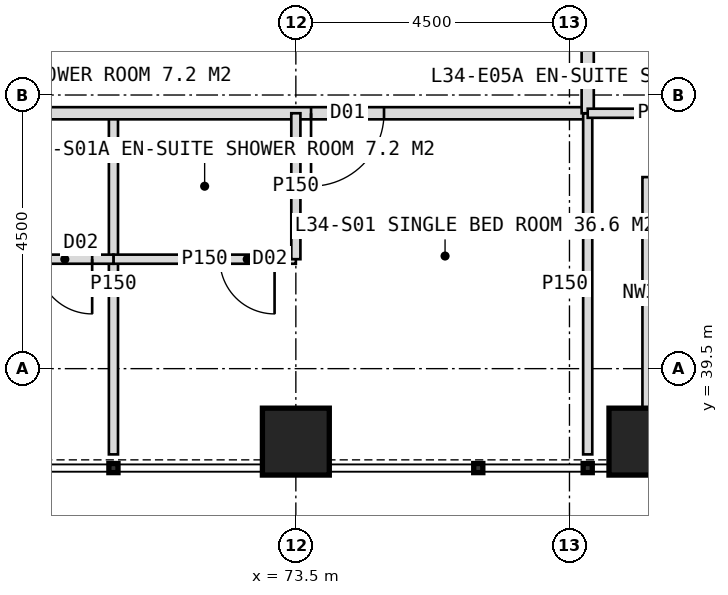
"""IFC4 building model, lengths in metres.
Left out: names, types, materials, properties, quantities, classifications, styles, units other than length and angle.
Written with IfcOpenShell. Run it as: python <this file> out.ifc"""

import sys

from ifc_helpers import new_model, si_unit, direction, frame, frame_2d, origin, origin_2d, place, context, subcontext, project, spatial, rectangle, hollow_rectangle, extrude, element, fill, save


model = new_model("IFC4")
c1 = context("Model", 3, precision=1e-05, world=origin(), true_north=direction((0.0, 1.0)))
c2 = subcontext(c1, "Body", "Model", "MODEL_VIEW")
j1 = project(units=[si_unit("LENGTHUNIT", "METRE"), si_unit("PLANEANGLEUNIT", "RADIAN")], contexts=[c1])
p1 = place(None, origin())
s1 = spatial("IfcSite", under=j1, at=p1, CompositionType="ELEMENT")
p2 = place(p1, origin())
s2 = spatial("IfcBuilding", under=s1, at=p2, CompositionType="ELEMENT")
p3 = place(p2, frame((0.0, 0.0, 144.0)))
s3 = spatial("IfcBuildingStorey", under=s2, at=p3, CompositionType="ELEMENT", Elevation=144.0)
for number, where, z_axis, x_axis in (
    (1, (73.5, 38.3, 0.0), (0.0, 0.0, 1.0), (1.0, 0.0, 0.0)),
    (2, (79.2, 38.3, 0.0), (0.0, 0.0, 1.0), (1.0, 0.0, 0.0)),
):
    element("IfcColumn", number, at=place(p3, frame(where, z_axis=z_axis, x_axis=x_axis)), inside=s3, PredefinedType="COLUMN", context=c2, shape_type="SweptSolid", body=[
        extrude(hollow_rectangle(XDim=1.1, YDim=1.1, WallThickness=0.1, at=origin_2d()), origin(), (0.0, 0.0, 1.0), 4.0),
    ])
p4 = place(p3, frame((79.35, 42.65, 0.0), z_axis=(0.0, 0.0, 1.0), x_axis=(0.0, -1.0, 0.0)))
e3 = element("IfcWall", 3, at=p4, inside=s3, PredefinedType="ELEMENTEDWALL", context=c2, shape_type="SweptSolid", body=[
    extrude(rectangle(XDim=3.8, YDim=0.3, at=frame_2d((1.9, 0.0))), origin(), (0.0, 0.0, 1.0), 4.0),
])
p5 = place(p3, frame((70.5, 43.7, 0.0), z_axis=(0.0, 0.0, 1.0), x_axis=(0.0, -1.0, 0.0)))
e4 = element("IfcWall", 4, at=p5, inside=s3, PredefinedType="PARTITIONING", context=c2, shape_type="SweptSolid", body=[
    extrude(rectangle(XDim=5.61, YDim=0.15, at=frame_2d((2.805, 0.0))), origin(), (0.0, 0.0, 1.0), 3.75),
])
p6 = place(p3, frame((78.3, 43.7, 0.0), z_axis=(0.0, 0.0, 1.0), x_axis=(-1.0, 0.0, 0.0)))
e5 = element("IfcWall", 5, at=p6, inside=s3, PredefinedType="PARTITIONING", context=c2, shape_type="SweptSolid", body=[
    extrude(rectangle(XDim=36.6, YDim=0.2, at=frame_2d((18.3, 0.0))), origin(), (0.0, 0.0, 1.0), 3.75),
])
p7 = place(p6, frame((3.35, 0.0, 0.0)))
e6 = element("IfcOpeningElement", 6, at=p7, cuts=e5, PredefinedType="OPENING", context=c2, shape_type="SweptSolid", body=[
    extrude(rectangle(XDim=1.2, YDim=2.2, at=frame_2d((0.6, 1.1))), frame((0.0, 0.11, 0.0), z_axis=(0.0, -1.0, 0.0), x_axis=(1.0, 0.0, 0.0)), (0.0, 0.0, 1.0), 0.22),
])
p8 = place(p6, frame((11.05, 0.0, 0.0)))
e7 = element("IfcOpeningElement", 7, at=p8, cuts=e5, PredefinedType="OPENING", context=c2, shape_type="SweptSolid", body=[
    extrude(rectangle(XDim=1.2, YDim=2.2, at=frame_2d((0.6, 1.1))), frame((0.0, 0.11, 0.0), z_axis=(0.0, -1.0, 0.0), x_axis=(1.0, 0.0, 0.0)), (0.0, 0.0, 1.0), 0.22),
])
p9 = place(p6, frame((19.85, 0.0, 0.0)))
e8 = element("IfcOpeningElement", 8, at=p9, cuts=e5, PredefinedType="OPENING", context=c2, shape_type="SweptSolid", body=[
    extrude(rectangle(XDim=1.2, YDim=2.2, at=frame_2d((0.6, 1.1))), frame((0.0, 0.11, 0.0), z_axis=(0.0, -1.0, 0.0), x_axis=(1.0, 0.0, 0.0)), (0.0, 0.0, 1.0), 0.22),
])
p10 = place(p6, frame((26.95, 0.0, 0.0)))
e9 = element("IfcOpeningElement", 9, at=p10, cuts=e5, PredefinedType="OPENING", context=c2, shape_type="SweptSolid", body=[
    extrude(rectangle(XDim=1.2, YDim=2.2, at=frame_2d((0.6, 1.1))), frame((0.0, 0.11, 0.0), z_axis=(0.0, -1.0, 0.0), x_axis=(1.0, 0.0, 0.0)), (0.0, 0.0, 1.0), 0.22),
])
p11 = place(p3, frame((78.3, 43.7, 0.0), z_axis=(0.0, 0.0, 1.0), x_axis=(0.0, -1.0, 0.0)))
e10 = element("IfcWall", 10, at=p11, inside=s3, PredefinedType="PARTITIONING", context=c2, shape_type="SweptSolid", body=[
    extrude(rectangle(XDim=5.61, YDim=0.15, at=frame_2d((2.805, 0.0))), origin(), (0.0, 0.0, 1.0), 3.75),
])
p12 = place(p3, frame((73.5, 41.3, 0.0), z_axis=(0.0, 0.0, 1.0), x_axis=(-1.0, 0.0, 0.0)))
e11 = element("IfcWall", 11, at=p12, inside=s3, PredefinedType="PARTITIONING", context=c2, shape_type="SweptSolid", body=[
    extrude(rectangle(XDim=3.0, YDim=0.15, at=frame_2d((1.5, 0.0))), origin(), (0.0, 0.0, 1.0), 3.75),
])
p13 = place(p12, frame((0.35, 0.0, 0.0)))
e12 = element("IfcOpeningElement", 12, at=p13, cuts=e11, PredefinedType="OPENING", context=c2, shape_type="SweptSolid", body=[
    extrude(rectangle(XDim=0.9, YDim=2.1, at=frame_2d((0.45, 1.05))), frame((0.0, 0.085, 0.0), z_axis=(0.0, -1.0, 0.0), x_axis=(1.0, 0.0, 0.0)), (0.0, 0.0, 1.0), 0.17),
])
p14 = place(p3, frame((73.5, 43.7, 0.0), z_axis=(0.0, 0.0, 1.0), x_axis=(0.0, -1.0, 0.0)))
e13 = element("IfcWall", 13, at=p14, inside=s3, PredefinedType="PARTITIONING", context=c2, shape_type="SweptSolid", body=[
    extrude(rectangle(XDim=2.4, YDim=0.15, at=frame_2d((1.2, 0.0))), origin(), (0.0, 0.0, 1.0), 2.95),
])
p15 = place(p3, frame((70.5, 41.3, 0.0), z_axis=(0.0, 0.0, 1.0), x_axis=(-1.0, 0.0, 0.0)))
e14 = element("IfcWall", 14, at=p15, inside=s3, PredefinedType="PARTITIONING", context=c2, shape_type="SweptSolid", body=[
    extrude(rectangle(XDim=3.0, YDim=0.15, at=frame_2d((1.5, 0.0))), origin(), (0.0, 0.0, 1.0), 3.75),
])
p16 = place(p15, frame((0.35, 0.0, 0.0)))
e15 = element("IfcOpeningElement", 15, at=p16, cuts=e14, PredefinedType="OPENING", context=c2, shape_type="SweptSolid", body=[
    extrude(rectangle(XDim=0.9, YDim=2.1, at=frame_2d((0.45, 1.05))), frame((0.0, 0.085, 0.0), z_axis=(0.0, -1.0, 0.0), x_axis=(1.0, 0.0, 0.0)), (0.0, 0.0, 1.0), 0.17),
])
p17 = place(p3, frame((78.3, 80.3, 0.0), z_axis=(0.0, 0.0, 1.0), x_axis=(0.0, -1.0, 0.0)))
e16 = element("IfcWall", 16, at=p17, inside=s3, PredefinedType="PARTITIONING", context=c2, shape_type="SweptSolid", body=[
    extrude(rectangle(XDim=36.6, YDim=0.2, at=frame_2d((18.3, 0.0))), origin(), (0.0, 0.0, 1.0), 3.75),
])
p18 = place(p17, frame((3.35, 0.0, 0.0)))
e17 = element("IfcOpeningElement", 17, at=p18, cuts=e16, PredefinedType="OPENING", context=c2, shape_type="SweptSolid", body=[
    extrude(rectangle(XDim=1.2, YDim=2.2, at=frame_2d((0.6, 1.1))), frame((0.0, 0.11, 0.0), z_axis=(0.0, -1.0, 0.0), x_axis=(1.0, 0.0, 0.0)), (0.0, 0.0, 1.0), 0.22),
])
p19 = place(p17, frame((11.05, 0.0, 0.0)))
e18 = element("IfcOpeningElement", 18, at=p19, cuts=e16, PredefinedType="OPENING", context=c2, shape_type="SweptSolid", body=[
    extrude(rectangle(XDim=1.2, YDim=2.2, at=frame_2d((0.6, 1.1))), frame((0.0, 0.11, 0.0), z_axis=(0.0, -1.0, 0.0), x_axis=(1.0, 0.0, 0.0)), (0.0, 0.0, 1.0), 0.22),
])
p20 = place(p17, frame((16.3, 0.0, 0.0)))
e19 = element("IfcOpeningElement", 19, at=p20, cuts=e16, PredefinedType="OPENING", context=c2, shape_type="SweptSolid", body=[
    extrude(rectangle(XDim=1.0, YDim=2.1, at=frame_2d((0.5, 1.05))), frame((0.0, 0.11, 0.0), z_axis=(0.0, -1.0, 0.0), x_axis=(1.0, 0.0, 0.0)), (0.0, 0.0, 1.0), 0.22),
])
p21 = place(p17, frame((21.55, 0.0, 0.0)))
e20 = element("IfcOpeningElement", 20, at=p21, cuts=e16, PredefinedType="OPENING", context=c2, shape_type="SweptSolid", body=[
    extrude(rectangle(XDim=1.2, YDim=2.2, at=frame_2d((0.6, 1.1))), frame((0.0, 0.11, 0.0), z_axis=(0.0, -1.0, 0.0), x_axis=(1.0, 0.0, 0.0)), (0.0, 0.0, 1.0), 0.22),
])
p22 = place(p17, frame((32.75, 0.0, 0.0)))
e21 = element("IfcOpeningElement", 21, at=p22, cuts=e16, PredefinedType="OPENING", context=c2, shape_type="SweptSolid", body=[
    extrude(rectangle(XDim=1.2, YDim=2.2, at=frame_2d((0.6, 1.1))), frame((0.0, 0.11, 0.0), z_axis=(0.0, -1.0, 0.0), x_axis=(1.0, 0.0, 0.0)), (0.0, 0.0, 1.0), 0.22),
])
p23 = place(p3, frame((78.3, 43.7, 0.0), z_axis=(0.0, 0.0, 1.0), x_axis=(1.0, 0.0, 0.0)))
e22 = element("IfcWall", 22, at=p23, inside=s3, PredefinedType="PARTITIONING", context=c2, shape_type="SweptSolid", body=[
    extrude(rectangle(XDim=2.4, YDim=0.15, at=frame_2d((1.2, 0.0))), origin(), (0.0, 0.0, 1.0), 3.75),
])
p24 = place(p7, origin())
e23 = element("IfcDoor", 23, at=p24, inside=s3, OperationType="SINGLE_SWING_RIGHT", PredefinedType="DOOR", context=c2, shape_type="SweptSolid", body=[
    extrude(rectangle(XDim=1.2, YDim=2.2, at=frame_2d((0.6, 1.1))), frame((0.0, 0.025, 0.0), z_axis=(0.0, -1.0, 0.0), x_axis=(1.0, 0.0, 0.0)), (0.0, 0.0, 1.0), 0.05),
])
fill(e6, e23)
p25 = place(p13, origin())
e24 = element("IfcDoor", 24, at=p25, inside=s3, OperationType="SINGLE_SWING_LEFT", PredefinedType="DOOR", context=c2, shape_type="SweptSolid", body=[
    extrude(rectangle(XDim=0.9, YDim=2.1, at=frame_2d((0.45, 1.05))), frame((0.0, 0.025, 0.0), z_axis=(0.0, -1.0, 0.0), x_axis=(1.0, 0.0, 0.0)), (0.0, 0.0, 1.0), 0.05),
])
fill(e12, e24)
p26 = place(p16, origin())
e25 = element("IfcDoor", 25, at=p26, inside=s3, OperationType="SINGLE_SWING_LEFT", PredefinedType="DOOR", context=c2, shape_type="SweptSolid", body=[
    extrude(rectangle(XDim=0.9, YDim=2.1, at=frame_2d((0.45, 1.05))), frame((0.0, 0.025, 0.0), z_axis=(0.0, -1.0, 0.0), x_axis=(1.0, 0.0, 0.0)), (0.0, 0.0, 1.0), 0.05),
])
fill(e15, e25)
save(model, sys.argv[1])
